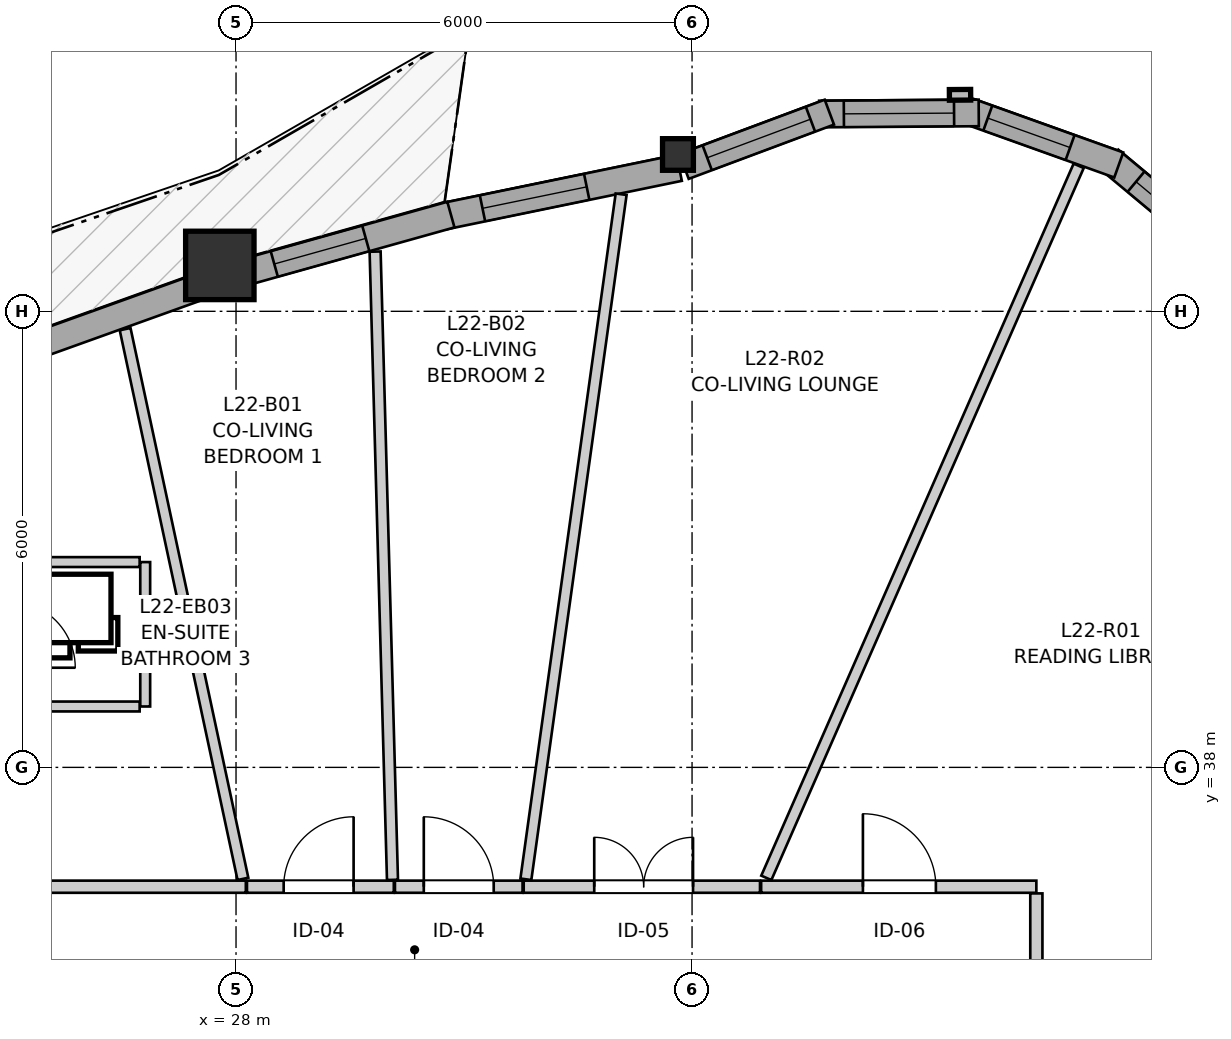
"""IFC4 building model, lengths in metres.
Left out: names, types, materials, properties, quantities, classifications, styles, units other than length and angle.
Written with IfcOpenShell. Run it as: python <this file> out.ifc"""

import sys

from ifc_helpers import new_model, si_unit, direction, frame, frame_2d, origin, origin_2d, place, context, subcontext, project, spatial, rectangle, i_section, extrude, source, transform, mapped, element, fill, save


model = new_model("IFC4")
c1 = context("Model", 3, precision=1e-05, world=origin(), true_north=direction((0.0, 1.0)))
c2 = subcontext(c1, "Body", "Model", "MODEL_VIEW")
j1 = project(units=[si_unit("LENGTHUNIT", "METRE"), si_unit("PLANEANGLEUNIT", "RADIAN")], contexts=[c1])
p1 = place(None, origin())
s1 = spatial("IfcSite", under=j1, at=p1, CompositionType="ELEMENT")
p2 = place(p1, origin())
s2 = spatial("IfcBuilding", under=s1, at=p2, CompositionType="ELEMENT")
p3 = place(p2, frame((0.0, 0.0, 76.8)))
s3 = spatial("IfcBuildingStorey", under=s2, at=p3, CompositionType="ELEMENT", Elevation=76.8)
m1 = source(origin(), c2, "Body", "SweptSolid", [
    extrude(i_section(OverallWidth=0.406, OverallDepth=0.416, WebThickness=0.027, FlangeThickness=0.044, FilletRadius=0.015, at=origin_2d()), origin(), (0.0, 0.0, 1.0), 2.935),
])
p4 = place(p3, frame((33.815, 46.063, 0.0), z_axis=(0.0, 0.0, 1.0), x_axis=(1.0, 0.0, 0.0)))
e1 = element("IfcColumn", 1, at=p4, inside=s3, PredefinedType="PILASTER", context=c2, shape_type="MappedRepresentation", body=[
    mapped(m1, transform((0.0, 0.0, 0.0), x_axis=(1.0, 0.0, 0.0), y_axis=(0.0, 1.0, 0.0), z_axis=(0.0, 0.0, 1.0), scale=1.0)),
])
m2 = source(origin(), c2, "Body", "SweptSolid", [
    extrude(rectangle(XDim=0.9, YDim=0.9, at=origin_2d()), origin(), (0.0, 0.0, 1.0), 2.935),
])
p5 = place(p3, frame((27.787, 44.604, 0.0), z_axis=(0.0, 0.0, 1.0), x_axis=(1.0, 0.0, 0.0)))
e2 = element("IfcColumn", 2, at=p5, inside=s3, PredefinedType="COLUMN", context=c2, shape_type="MappedRepresentation", body=[
    mapped(m2, transform((0.0, 0.0, 0.0), x_axis=(1.0, 0.0, 0.0), y_axis=(0.0, 1.0, 0.0), z_axis=(0.0, 0.0, 1.0), scale=1.0)),
])
p6 = place(p3, frame((41.109, 44.65, 0.0), z_axis=(0.0, 0.0, 1.0), x_axis=(-0.768450068703, 0.639909752942, 0.0)))
e3 = element("IfcWall", 3, at=p6, inside=s3, PredefinedType="SOLIDWALL", context=c2, shape_type="SweptSolid", body=[
    extrude(rectangle(XDim=2.099, YDim=0.35, at=frame_2d((1.049, 0.0))), origin(), (0.0, 0.0, 1.0), 2.465),
])
p7 = place(p6, frame((0.449, 0.0, 0.82)))
e4 = element("IfcOpeningElement", 4, at=p7, cuts=e3, PredefinedType="OPENING", context=c2, shape_type="SweptSolid", body=[
    extrude(rectangle(XDim=1.2, YDim=1.45, at=frame_2d((0.6, 0.725))), frame((0.0, 0.185, 0.0), z_axis=(0.0, -1.0, 0.0), x_axis=(1.0, 0.0, 0.0)), (0.0, 0.0, 1.0), 0.37),
])
p8 = place(p3, frame((39.614, 45.925, 0.0), z_axis=(0.0, 0.0, 1.0), x_axis=(-0.941486401639, 0.33705096874, 0.0)))
e5 = element("IfcWall", 5, at=p8, inside=s3, PredefinedType="SOLIDWALL", context=c2, shape_type="SweptSolid", body=[
    extrude(rectangle(XDim=2.099, YDim=0.35, at=frame_2d((1.05, 0.0))), origin(), (0.0, 0.0, 1.0), 2.465),
])
p9 = place(p8, frame((0.68, 0.0, 0.82)))
e6 = element("IfcOpeningElement", 6, at=p9, cuts=e5, PredefinedType="OPENING", context=c2, shape_type="SweptSolid", body=[
    extrude(rectangle(XDim=1.15, YDim=1.2, at=frame_2d((0.575, 0.6))), frame((0.0, 0.185, 0.0), z_axis=(0.0, -1.0, 0.0), x_axis=(1.0, 0.0, 0.0)), (0.0, 0.0, 1.0), 0.37),
])
p10 = place(p3, frame((37.772, 46.61, 0.0), z_axis=(0.0, 0.0, 1.0), x_axis=(-0.999976451414, -0.006862697526, 0.0)))
e7 = element("IfcWall", 7, at=p10, inside=s3, PredefinedType="SOLIDWALL", context=c2, shape_type="SweptSolid", body=[
    extrude(rectangle(XDim=2.099, YDim=0.35, at=frame_2d((1.049, 0.0))), origin(), (0.0, 0.0, 1.0), 2.465),
])
p11 = place(p10, frame((0.324, 0.0, 0.82)))
e8 = element("IfcOpeningElement", 8, at=p11, cuts=e7, PredefinedType="OPENING", context=c2, shape_type="SweptSolid", body=[
    extrude(rectangle(XDim=1.45, YDim=1.25, at=frame_2d((0.725, 0.625))), frame((0.0, 0.185, 0.0), z_axis=(0.0, -1.0, 0.0), x_axis=(1.0, 0.0, 0.0)), (0.0, 0.0, 1.0), 0.37),
])
p12 = place(p3, frame((35.806, 46.62, 0.0), z_axis=(0.0, 0.0, 1.0), x_axis=(-0.936863987578, -0.34969396446, 0.0)))
e9 = element("IfcWall", 9, at=p12, inside=s3, PredefinedType="SOLIDWALL", context=c2, shape_type="SweptSolid", body=[
    extrude(rectangle(XDim=2.041, YDim=0.35, at=frame_2d((1.021, 0.0))), origin(), (0.0, 0.0, 1.0), 2.465),
])
p13 = place(p12, frame((0.265, 0.0, 0.82)))
e10 = element("IfcOpeningElement", 10, at=p13, cuts=e9, PredefinedType="OPENING", context=c2, shape_type="SweptSolid", body=[
    extrude(rectangle(XDim=1.45, YDim=1.25, at=frame_2d((0.725, 0.625))), frame((0.0, 0.185, 0.0), z_axis=(0.0, -1.0, 0.0), x_axis=(1.0, 0.0, 0.0)), (0.0, 0.0, 1.0), 0.37),
])
p14 = place(p3, frame((33.83, 45.888, 0.0), z_axis=(0.0, 0.0, 1.0), x_axis=(-0.979439051097, -0.201740291429, 0.0)))
e11 = element("IfcWall", 11, at=p14, inside=s3, PredefinedType="SOLIDWALL", context=c2, shape_type="SweptSolid", body=[
    extrude(rectangle(XDim=3.154, YDim=0.35, at=frame_2d((1.577, 0.0))), origin(), (0.0, 0.0, 1.0), 2.465),
])
p15 = place(p14, frame((1.242, 0.0, 0.82)))
e12 = element("IfcOpeningElement", 12, at=p15, cuts=e11, PredefinedType="OPENING", context=c2, shape_type="SweptSolid", body=[
    extrude(rectangle(XDim=1.4, YDim=1.35, at=frame_2d((0.7, 0.675))), frame((0.0, 0.185, 0.0), z_axis=(0.0, -1.0, 0.0), x_axis=(1.0, 0.0, 0.0)), (0.0, 0.0, 1.0), 0.37),
])
p16 = place(p3, frame((30.827, 45.272, 0.0), z_axis=(0.0, 0.0, 1.0), x_axis=(-0.963061576901, -0.269281263918, 0.0)))
e13 = element("IfcWall", 13, at=p16, inside=s3, PredefinedType="SOLIDWALL", context=c2, shape_type="SweptSolid", body=[
    extrude(rectangle(XDim=2.883, YDim=0.35, at=frame_2d((1.441, 0.0))), origin(), (0.0, 0.0, 1.0), 2.465),
])
p17 = place(p16, frame((1.163, 0.0, 0.82)))
e14 = element("IfcOpeningElement", 14, at=p17, cuts=e13, PredefinedType="OPENING", context=c2, shape_type="SweptSolid", body=[
    extrude(rectangle(XDim=1.25, YDim=1.35, at=frame_2d((0.625, 0.675))), frame((0.0, 0.185, 0.0), z_axis=(0.0, -1.0, 0.0), x_axis=(1.0, 0.0, 0.0)), (0.0, 0.0, 1.0), 0.37),
])
p18 = place(p3, frame((27.634, 44.363, 0.0), z_axis=(0.0, 0.0, 1.0), x_axis=(-0.941122275829, -0.3380663573, 0.0)))
e15 = element("IfcWall", 15, at=p18, inside=s3, PredefinedType="SOLIDWALL", context=c2, shape_type="SweptSolid", body=[
    extrude(rectangle(XDim=2.833, YDim=0.35, at=frame_2d((1.417, 0.0))), origin(), (0.0, 0.0, 1.0), 2.465),
])
p19 = place(p3, frame((23.284, 36.43, 0.0), z_axis=(0.0, 0.0, 1.0), x_axis=(1.0, 0.0, 0.0)))
e16 = element("IfcWall", 16, at=p19, inside=s3, PredefinedType="PARTITIONING", context=c2, shape_type="SweptSolid", body=[
    extrude(rectangle(XDim=4.845, YDim=0.16, at=frame_2d((2.422, 0.0))), origin(), (0.0, 0.0, 1.0), 2.935),
])
p20 = place(p19, frame((0.22, 0.0, 0.0)))
e17 = element("IfcOpeningElement", 17, at=p20, cuts=e16, PredefinedType="OPENING", context=c2, shape_type="SweptSolid", body=[
    extrude(rectangle(XDim=0.92, YDim=2.1, at=frame_2d((0.46, 1.05))), frame((0.0, 0.09, 0.0), z_axis=(0.0, -1.0, 0.0), x_axis=(1.0, 0.0, 0.0)), (0.0, 0.0, 1.0), 0.18),
])
p21 = place(p3, frame((34.909, 36.43, 0.0), z_axis=(0.0, 0.0, 1.0), x_axis=(1.0, 0.0, 0.0)))
e18 = element("IfcWall", 18, at=p21, inside=s3, PredefinedType="PARTITIONING", context=c2, shape_type="SweptSolid", body=[
    extrude(rectangle(XDim=3.621, YDim=0.16, at=frame_2d((1.811, 0.0))), origin(), (0.0, 0.0, 1.0), 2.573),
])
p22 = place(p21, frame((1.339, 0.0, 0.0)))
e19 = element("IfcOpeningElement", 19, at=p22, cuts=e18, PredefinedType="OPENING", context=c2, shape_type="SweptSolid", body=[
    extrude(rectangle(XDim=0.96, YDim=2.1, at=frame_2d((0.48, 1.05))), frame((0.0, 0.09, 0.0), z_axis=(0.0, -1.0, 0.0), x_axis=(1.0, 0.0, 0.0)), (0.0, 0.0, 1.0), 0.18),
])
p23 = place(p3, frame((31.785, 36.43, 0.0), z_axis=(0.0, 0.0, 1.0), x_axis=(1.0, 0.0, 0.0)))
e20 = element("IfcWall", 20, at=p23, inside=s3, PredefinedType="PARTITIONING", context=c2, shape_type="SweptSolid", body=[
    extrude(rectangle(XDim=3.109, YDim=0.16, at=frame_2d((1.555, 0.0))), origin(), (0.0, 0.0, 1.0), 2.935),
])
p24 = place(p23, frame((0.928, 0.0, 0.0)))
e21 = element("IfcOpeningElement", 21, at=p24, cuts=e20, PredefinedType="OPENING", context=c2, shape_type="SweptSolid", body=[
    extrude(rectangle(XDim=1.3, YDim=2.1, at=frame_2d((0.65, 1.05))), frame((0.0, 0.09, 0.0), z_axis=(0.0, -1.0, 0.0), x_axis=(1.0, 0.0, 0.0)), (0.0, 0.0, 1.0), 0.18),
])
p25 = place(p3, frame((28.144, 36.43, 0.0), z_axis=(0.0, 0.0, 1.0), x_axis=(1.0, 0.0, 0.0)))
e22 = element("IfcWall", 22, at=p25, inside=s3, PredefinedType="PARTITIONING", context=c2, shape_type="SweptSolid", body=[
    extrude(rectangle(XDim=1.932, YDim=0.16, at=frame_2d((0.966, 0.0))), origin(), (0.0, 0.0, 1.0), 2.935),
])
p26 = place(p25, frame((0.483, 0.0, 0.0)))
e23 = element("IfcOpeningElement", 23, at=p26, cuts=e22, PredefinedType="OPENING", context=c2, shape_type="SweptSolid", body=[
    extrude(rectangle(XDim=0.92, YDim=2.1, at=frame_2d((0.46, 1.05))), frame((0.0, 0.09, 0.0), z_axis=(0.0, -1.0, 0.0), x_axis=(1.0, 0.0, 0.0)), (0.0, 0.0, 1.0), 0.18),
])
p27 = place(p3, frame((30.091, 36.43, 0.0), z_axis=(0.0, 0.0, 1.0), x_axis=(1.0, 0.0, 0.0)))
e24 = element("IfcWall", 24, at=p27, inside=s3, PredefinedType="PARTITIONING", context=c2, shape_type="SweptSolid", body=[
    extrude(rectangle(XDim=1.679, YDim=0.16, at=frame_2d((0.839, 0.0))), origin(), (0.0, 0.0, 1.0), 2.935),
])
p28 = place(p27, frame((0.379, 0.0, 0.0)))
e25 = element("IfcOpeningElement", 25, at=p28, cuts=e24, PredefinedType="OPENING", context=c2, shape_type="SweptSolid", body=[
    extrude(rectangle(XDim=0.92, YDim=2.1, at=frame_2d((0.46, 1.05))), frame((0.0, 0.09, 0.0), z_axis=(0.0, -1.0, 0.0), x_axis=(1.0, 0.0, 0.0)), (0.0, 0.0, 1.0), 0.18),
])
p29 = place(p3, frame((34.977, 36.546, 0.0), z_axis=(0.0, 0.0, 1.0), x_axis=(0.40175384449, 0.915747699117, 0.0)))
e26 = element("IfcWall", 26, at=p29, inside=s3, PredefinedType="PARTITIONING", context=c2, shape_type="SweptSolid", body=[
    extrude(rectangle(XDim=10.23, YDim=0.145, at=frame_2d((5.115, 0.0))), origin(), (0.0, 0.0, 1.0), 2.935),
])
p30 = place(p3, frame((31.814, 36.528, 0.0), z_axis=(0.0, 0.0, 1.0), x_axis=(0.137724115974, 0.990470629488, 0.0)))
e27 = element("IfcWall", 27, at=p30, inside=s3, PredefinedType="PARTITIONING", context=c2, shape_type="SweptSolid", body=[
    extrude(rectangle(XDim=9.099, YDim=0.145, at=frame_2d((4.55, 0.0))), origin(), (0.0, 0.0, 1.0), 2.935),
])
p31 = place(p3, frame((29.83, 44.785, 0.0), z_axis=(0.0, 0.0, 1.0), x_axis=(0.027636759054, -0.999618031825, 0.0)))
e28 = element("IfcWall", 28, at=p31, inside=s3, PredefinedType="PARTITIONING", context=c2, shape_type="SweptSolid", body=[
    extrude(rectangle(XDim=8.269, YDim=0.145, at=frame_2d((4.134, 0.0))), origin(), (0.0, 0.0, 1.0), 2.935),
])
p32 = place(p3, frame((26.541, 43.766, 0.0), z_axis=(0.0, 0.0, 1.0), x_axis=(0.209522326513, -0.9778038631, 0.0)))
e29 = element("IfcWall", 29, at=p32, inside=s3, PredefinedType="PARTITIONING", context=c2, shape_type="SweptSolid", body=[
    extrude(rectangle(XDim=7.397, YDim=0.145, at=frame_2d((3.698, 0.0))), origin(), (0.0, 0.0, 1.0), 2.103),
])
p33 = place(p3, frame((38.665, 33.63, 0.0), z_axis=(0.0, 0.0, 1.0), x_axis=(0.736824900837, 0.676083623161, 0.0)))
e30 = element("IfcWall", 30, at=p33, inside=s3, PredefinedType="PARTITIONING", context=c2, shape_type="SweptSolid", body=[
    extrude(rectangle(XDim=6.25, YDim=0.145, at=frame_2d((3.125, 0.0))), origin(), (0.0, 0.0, 1.0), 2.935),
])
p34 = place(p3, frame((38.53, 33.721, 0.0), z_axis=(0.0, 0.0, 1.0), x_axis=(0.0, 1.0, 0.0)))
e31 = element("IfcWall", 31, at=p34, inside=s3, PredefinedType="PARTITIONING", context=c2, shape_type="SweptSolid", body=[
    extrude(rectangle(XDim=2.621, YDim=0.16, at=frame_2d((1.311, 0.0))), origin(), (0.0, 0.0, 1.0), 2.573),
])
p35 = place(p3, frame((26.805, 38.801, 0.0), z_axis=(0.0, 0.0, 1.0), x_axis=(0.0, 1.0, 0.0)))
e32 = element("IfcWall", 32, at=p35, inside=s3, PredefinedType="PARTITIONING", context=c2, shape_type="SweptSolid", body=[
    extrude(rectangle(XDim=1.9, YDim=0.13, at=frame_2d((0.95, 0.0))), origin(), (0.0, 0.0, 1.0), 2.103),
])
for number, where, z_axis, x_axis in (
    (33, (25.078, 40.701, 0.0), (0.0, 0.0, 1.0), (1.0, 0.0, 0.0)),
    (34, (25.078, 38.801, 0.0), (0.0, 0.0, 1.0), (1.0, 0.0, 0.0)),
):
    element("IfcWall", number, at=place(p3, frame(where, z_axis=z_axis, x_axis=x_axis)), inside=s3, PredefinedType="PARTITIONING", context=c2, shape_type="SweptSolid", body=[
        extrude(rectangle(XDim=1.654, YDim=0.13, at=frame_2d((0.827, 0.0))), origin(), (0.0, 0.0, 1.0), 2.935),
    ])
m3 = source(origin(), c2, "Body", "SweptSolid", [
    extrude(rectangle(XDim=1.2, YDim=1.45, at=frame_2d((0.6, 0.725))), frame((0.0, 0.03, 0.0), z_axis=(0.0, -1.0, 0.0), x_axis=(1.0, 0.0, 0.0)), (0.0, 0.0, 1.0), 0.06),
])
p36 = place(p7, origin())
e35 = element("IfcWindow", 35, at=p36, inside=s3, PartitioningType="SINGLE_PANEL", PredefinedType="WINDOW", context=c2, shape_type="MappedRepresentation", body=[
    mapped(m3, transform((0.0, 0.0, 0.0), x_axis=(1.0, 0.0, 0.0), y_axis=(0.0, 1.0, 0.0), z_axis=(0.0, 0.0, 1.0), scale=1.0)),
])
fill(e4, e35)
m4 = source(origin(), c2, "Body", "SweptSolid", [
    extrude(rectangle(XDim=1.15, YDim=1.2, at=frame_2d((0.575, 0.6))), frame((0.0, 0.03, 0.0), z_axis=(0.0, -1.0, 0.0), x_axis=(1.0, 0.0, 0.0)), (0.0, 0.0, 1.0), 0.06),
])
p37 = place(p9, origin())
e36 = element("IfcWindow", 36, at=p37, inside=s3, PartitioningType="SINGLE_PANEL", PredefinedType="WINDOW", context=c2, shape_type="MappedRepresentation", body=[
    mapped(m4, transform((0.0, 0.0, 0.0), x_axis=(1.0, 0.0, 0.0), y_axis=(0.0, 1.0, 0.0), z_axis=(0.0, 0.0, 1.0), scale=1.0)),
])
fill(e6, e36)
m5 = source(origin(), c2, "Body", "SweptSolid", [
    extrude(rectangle(XDim=1.45, YDim=1.25, at=frame_2d((0.725, 0.625))), frame((0.0, 0.03, 0.0), z_axis=(0.0, -1.0, 0.0), x_axis=(1.0, 0.0, 0.0)), (0.0, 0.0, 1.0), 0.06),
])
p38 = place(p11, origin())
e37 = element("IfcWindow", 37, at=p38, inside=s3, PartitioningType="SINGLE_PANEL", PredefinedType="WINDOW", context=c2, shape_type="MappedRepresentation", body=[
    mapped(m5, transform((0.0, 0.0, 0.0), x_axis=(1.0, 0.0, 0.0), y_axis=(0.0, 1.0, 0.0), z_axis=(0.0, 0.0, 1.0), scale=1.0)),
])
fill(e8, e37)
p39 = place(p13, origin())
e38 = element("IfcWindow", 38, at=p39, inside=s3, PartitioningType="SINGLE_PANEL", PredefinedType="WINDOW", context=c2, shape_type="MappedRepresentation", body=[
    mapped(m5, transform((0.0, 0.0, 0.0), x_axis=(1.0, 0.0, 0.0), y_axis=(0.0, 1.0, 0.0), z_axis=(0.0, 0.0, 1.0), scale=1.0)),
])
fill(e10, e38)
m6 = source(origin(), c2, "Body", "SweptSolid", [
    extrude(rectangle(XDim=1.4, YDim=1.35, at=frame_2d((0.7, 0.675))), frame((0.0, 0.03, 0.0), z_axis=(0.0, -1.0, 0.0), x_axis=(1.0, 0.0, 0.0)), (0.0, 0.0, 1.0), 0.06),
])
p40 = place(p15, origin())
e39 = element("IfcWindow", 39, at=p40, inside=s3, PartitioningType="SINGLE_PANEL", PredefinedType="WINDOW", context=c2, shape_type="MappedRepresentation", body=[
    mapped(m6, transform((0.0, 0.0, 0.0), x_axis=(1.0, 0.0, 0.0), y_axis=(0.0, 1.0, 0.0), z_axis=(0.0, 0.0, 1.0), scale=1.0)),
])
fill(e12, e39)
m7 = source(origin(), c2, "Body", "SweptSolid", [
    extrude(rectangle(XDim=1.25, YDim=1.35, at=frame_2d((0.625, 0.675))), frame((0.0, 0.03, 0.0), z_axis=(0.0, -1.0, 0.0), x_axis=(1.0, 0.0, 0.0)), (0.0, 0.0, 1.0), 0.06),
])
p41 = place(p17, origin())
e40 = element("IfcWindow", 40, at=p41, inside=s3, PartitioningType="SINGLE_PANEL", PredefinedType="WINDOW", context=c2, shape_type="MappedRepresentation", body=[
    mapped(m7, transform((0.0, 0.0, 0.0), x_axis=(1.0, 0.0, 0.0), y_axis=(0.0, 1.0, 0.0), z_axis=(0.0, 0.0, 1.0), scale=1.0)),
])
fill(e14, e40)
m8 = source(origin(), c2, "Body", "SweptSolid", [
    extrude(rectangle(XDim=0.96, YDim=2.1, at=frame_2d((0.48, 1.05))), frame((0.0, 0.025, 0.0), z_axis=(0.0, -1.0, 0.0), x_axis=(1.0, 0.0, 0.0)), (0.0, 0.0, 1.0), 0.05),
])
p42 = place(p22, origin())
e41 = element("IfcDoor", 41, at=p42, inside=s3, OperationType="SINGLE_SWING_LEFT", PredefinedType="DOOR", context=c2, shape_type="MappedRepresentation", body=[
    mapped(m8, transform((0.0, 0.0, 0.0), x_axis=(1.0, 0.0, 0.0), y_axis=(0.0, 1.0, 0.0), z_axis=(0.0, 0.0, 1.0), scale=1.0)),
])
fill(e19, e41)
m9 = source(origin(), c2, "Body", "SweptSolid", [
    extrude(rectangle(XDim=1.3, YDim=2.1, at=frame_2d((0.65, 1.05))), frame((0.0, 0.025, 0.0), z_axis=(0.0, -1.0, 0.0), x_axis=(1.0, 0.0, 0.0)), (0.0, 0.0, 1.0), 0.05),
])
p43 = place(p24, origin())
e42 = element("IfcDoor", 42, at=p43, inside=s3, OperationType="DOUBLE_DOOR_SINGLE_SWING", PredefinedType="DOOR", context=c2, shape_type="MappedRepresentation", body=[
    mapped(m9, transform((0.0, 0.0, 0.0), x_axis=(1.0, 0.0, 0.0), y_axis=(0.0, 1.0, 0.0), z_axis=(0.0, 0.0, 1.0), scale=1.0)),
])
fill(e21, e42)
m10 = source(origin(), c2, "Body", "SweptSolid", [
    extrude(rectangle(XDim=0.92, YDim=2.1, at=frame_2d((0.46, 1.05))), frame((0.0, 0.025, 0.0), z_axis=(0.0, -1.0, 0.0), x_axis=(1.0, 0.0, 0.0)), (0.0, 0.0, 1.0), 0.05),
])
p44 = place(p26, origin())
e43 = element("IfcDoor", 43, at=p44, inside=s3, OperationType="SINGLE_SWING_RIGHT", PredefinedType="DOOR", context=c2, shape_type="MappedRepresentation", body=[
    mapped(m10, transform((0.0, 0.0, 0.0), x_axis=(1.0, 0.0, 0.0), y_axis=(0.0, 1.0, 0.0), z_axis=(0.0, 0.0, 1.0), scale=1.0)),
])
fill(e23, e43)
p45 = place(p28, origin())
e44 = element("IfcDoor", 44, at=p45, inside=s3, OperationType="SINGLE_SWING_LEFT", PredefinedType="DOOR", context=c2, shape_type="MappedRepresentation", body=[
    mapped(m10, transform((0.0, 0.0, 0.0), x_axis=(1.0, 0.0, 0.0), y_axis=(0.0, 1.0, 0.0), z_axis=(0.0, 0.0, 1.0), scale=1.0)),
])
fill(e25, e44)
save(model, sys.argv[1])
